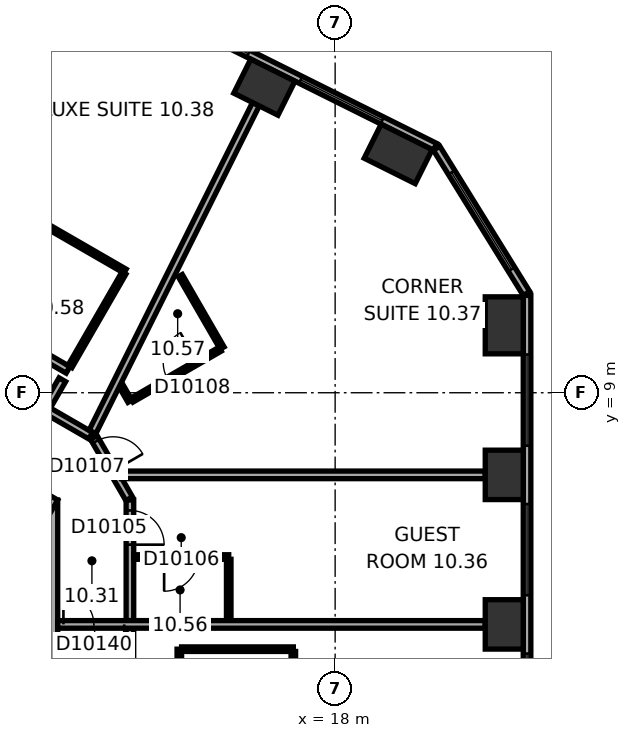
"""IFC4 building model, lengths in metres.
Left out: names, types, materials, properties, quantities, classifications, styles, units other than length and angle.
Written with IfcOpenShell. Run it as: python <this file> out.ifc"""

import sys

from ifc_helpers import new_model, si_unit, direction, frame, frame_2d, origin, origin_2d, place, context, subcontext, project, spatial, rectangle, extrude, element, fill, save


model = new_model("IFC4")
c1 = context("Model", 3, precision=1e-05, world=origin(), true_north=direction((0.0, 1.0)))
c2 = subcontext(c1, "Body", "Model", "MODEL_VIEW")
j1 = project(units=[si_unit("LENGTHUNIT", "METRE"), si_unit("PLANEANGLEUNIT", "RADIAN")], contexts=[c1])
p1 = place(None, origin())
s1 = spatial("IfcSite", under=j1, at=p1, CompositionType="ELEMENT")
p2 = place(p1, origin())
s2 = spatial("IfcBuilding", under=s1, at=p2, CompositionType="ELEMENT")
p3 = place(p2, frame((0.0, 0.0, 53.9)))
s3 = spatial("IfcBuildingStorey", under=s2, at=p3, CompositionType="ELEMENT", Elevation=53.9)
for number, where, z_axis, x_axis in (
    (1, (22.45, 2.905, 0.0), (0.0, 0.0, 1.0), (0.0, 1.0, 0.0)),
    (2, (22.45, 6.839, 0.0), (0.0, 0.0, 1.0), (0.0, 1.0, 0.0)),
):
    element("IfcColumn", number, at=place(p3, frame(where, z_axis=z_axis, x_axis=x_axis)), inside=s3, PredefinedType="COLUMN", context=c2, shape_type="SweptSolid", body=[
        extrude(rectangle(XDim=1.3, YDim=1.0, at=origin_2d()), origin(), (0.0, 0.0, 1.0), 3.3),
    ])
for number, where, z_axis, x_axis in (
    (3, (22.45, 10.774, 0.0), (0.0, 0.0, 1.0), (0.0, 1.0, 0.0)),
    (4, (19.659, 15.284, 0.0), (0.0, 0.0, 1.0), (-0.895, 0.446, 0.0)),
):
    element("IfcColumn", number, at=place(p3, frame(where, z_axis=z_axis, x_axis=x_axis)), inside=s3, PredefinedType="COLUMN", context=c2, shape_type="SweptSolid", body=[
        extrude(rectangle(XDim=1.5, YDim=1.0, at=origin_2d()), origin(), (0.0, 0.0, 1.0), 3.3),
    ])
p4 = place(p3, frame((16.138, 17.04, 0.0), z_axis=(0.0, 0.0, 1.0), x_axis=(-0.894934361602, 0.44619781311, 0.0)))
e5 = element("IfcColumn", 5, at=p4, inside=s3, PredefinedType="COLUMN", context=c2, shape_type="SweptSolid", body=[
    extrude(rectangle(XDim=1.3, YDim=1.0, at=origin_2d()), origin(), (0.0, 0.0, 1.0), 3.3),
])
p5 = place(p3, frame((10.1, -6.177, 0.0), z_axis=(0.0, 0.0, 1.0), x_axis=(0.0, 1.0, 0.0)))
e6 = element("IfcWall", 6, at=p5, inside=s3, PredefinedType="SHEAR", context=c2, shape_type="SweptSolid", body=[
    extrude(rectangle(XDim=12.355, YDim=1.2, at=frame_2d((6.177, 0.0))), origin(), (0.0, 0.0, 1.0), 3.3),
])
p6 = place(p5, frame((6.378, 0.0, 0.0)))
e7 = element("IfcOpeningElement", 7, at=p6, cuts=e6, PredefinedType="OPENING", context=c2, shape_type="SweptSolid", body=[
    extrude(rectangle(XDim=1.5, YDim=2.1, at=frame_2d((0.75, 1.05))), frame((0.0, 0.61, 0.0), z_axis=(0.0, -1.0, 0.0), x_axis=(1.0, 0.0, 0.0)), (0.0, 0.0, 1.0), 1.22),
])
p7 = place(p5, frame((1.828, 0.0, 0.0)))
e8 = element("IfcOpeningElement", 8, at=p7, cuts=e6, PredefinedType="OPENING", context=c2, shape_type="SweptSolid", body=[
    extrude(rectangle(XDim=1.1, YDim=2.1, at=frame_2d((0.55, 1.05))), frame((0.0, 0.61, 0.0), z_axis=(0.0, -1.0, 0.0), x_axis=(1.0, 0.0, 0.0)), (0.0, 0.0, 1.0), 1.22),
])
p8 = place(p5, frame((4.427, 0.0, 0.0)))
e9 = element("IfcOpeningElement", 9, at=p8, cuts=e6, PredefinedType="OPENING", context=c2, shape_type="SweptSolid", body=[
    extrude(rectangle(XDim=1.1, YDim=2.1, at=frame_2d((0.55, 1.05))), frame((0.0, 0.61, 0.0), z_axis=(0.0, -1.0, 0.0), x_axis=(1.0, 0.0, 0.0)), (0.0, 0.0, 1.0), 1.22),
])
p9 = place(p3, frame((10.4, 5.658, 0.0), z_axis=(0.0, 0.0, 1.0), x_axis=(-0.866021384402, 0.500006961711, 0.0)))
e10 = element("IfcWall", 10, at=p9, inside=s3, PredefinedType="SHEAR", context=c2, shape_type="SweptSolid", body=[
    extrude(rectangle(XDim=12.355, YDim=1.2, at=frame_2d((6.178, 0.0))), origin(), (0.0, 0.0, 1.0), 3.3),
])
p10 = place(p9, frame((2.728, 0.0, 0.0)))
e11 = element("IfcOpeningElement", 11, at=p10, cuts=e10, PredefinedType="OPENING", context=c2, shape_type="SweptSolid", body=[
    extrude(rectangle(XDim=1.1, YDim=2.1, at=frame_2d((0.55, 1.05))), frame((0.0, 0.61, 0.0), z_axis=(0.0, -1.0, 0.0), x_axis=(1.0, 0.0, 0.0)), (0.0, 0.0, 1.0), 1.22),
])
p11 = place(p9, frame((5.328, 0.0, 0.0)))
e12 = element("IfcOpeningElement", 12, at=p11, cuts=e10, PredefinedType="OPENING", context=c2, shape_type="SweptSolid", body=[
    extrude(rectangle(XDim=1.1, YDim=2.1, at=frame_2d((0.55, 1.05))), frame((0.0, 0.61, 0.0), z_axis=(0.0, -1.0, 0.0), x_axis=(1.0, 0.0, 0.0)), (0.0, 0.0, 1.0), 1.22),
])
p12 = place(p9, frame((7.928, 0.0, 0.0)))
e13 = element("IfcOpeningElement", 13, at=p12, cuts=e10, PredefinedType="OPENING", context=c2, shape_type="SweptSolid", body=[
    extrude(rectangle(XDim=1.1, YDim=2.1, at=frame_2d((0.55, 1.05))), frame((0.0, 0.61, 0.0), z_axis=(0.0, -1.0, 0.0), x_axis=(1.0, 0.0, 0.0)), (0.0, 0.0, 1.0), 1.22),
])
p13 = place(p3, frame((23.05, -9.687, 0.0), z_axis=(0.0, 0.0, 1.0), x_axis=(0.0, 1.0, 0.0)))
e14 = element("IfcWall", 14, at=p13, inside=s3, PredefinedType="STANDARD", context=c2, shape_type="SweptSolid", body=[
    extrude(rectangle(XDim=21.246, YDim=0.2, at=frame_2d((10.623, 0.0))), origin(), (0.0, 0.0, 1.0), 3.3),
])
p14 = place(p13, frame((1.555, 0.0, 0.8)))
e15 = element("IfcOpeningElement", 15, at=p14, cuts=e14, PredefinedType="OPENING", context=c2, shape_type="SweptSolid", body=[
    extrude(rectangle(XDim=2.4, YDim=1.7, at=frame_2d((1.2, 0.85))), frame((0.0, 0.11, 0.0), z_axis=(0.0, -1.0, 0.0), x_axis=(1.0, 0.0, 0.0)), (0.0, 0.0, 1.0), 0.22),
])
p15 = place(p13, frame((5.489, 0.0, 0.8)))
e16 = element("IfcOpeningElement", 16, at=p15, cuts=e14, PredefinedType="OPENING", context=c2, shape_type="SweptSolid", body=[
    extrude(rectangle(XDim=2.4, YDim=1.7, at=frame_2d((1.2, 0.85))), frame((0.0, 0.11, 0.0), z_axis=(0.0, -1.0, 0.0), x_axis=(1.0, 0.0, 0.0)), (0.0, 0.0, 1.0), 0.22),
])
p16 = place(p13, frame((9.424, 0.0, 0.8)))
e17 = element("IfcOpeningElement", 17, at=p16, cuts=e14, PredefinedType="OPENING", context=c2, shape_type="SweptSolid", body=[
    extrude(rectangle(XDim=2.4, YDim=1.7, at=frame_2d((1.2, 0.85))), frame((0.0, 0.11, 0.0), z_axis=(0.0, -1.0, 0.0), x_axis=(1.0, 0.0, 0.0)), (0.0, 0.0, 1.0), 0.22),
])
p17 = place(p13, frame((13.358, 0.0, 0.8)))
e18 = element("IfcOpeningElement", 18, at=p17, cuts=e14, PredefinedType="OPENING", context=c2, shape_type="SweptSolid", body=[
    extrude(rectangle(XDim=2.4, YDim=1.7, at=frame_2d((1.2, 0.85))), frame((0.0, 0.11, 0.0), z_axis=(0.0, -1.0, 0.0), x_axis=(1.0, 0.0, 0.0)), (0.0, 0.0, 1.0), 0.22),
])
p18 = place(p13, frame((17.293, 0.0, 0.8)))
e19 = element("IfcOpeningElement", 19, at=p18, cuts=e14, PredefinedType="OPENING", context=c2, shape_type="SweptSolid", body=[
    extrude(rectangle(XDim=2.4, YDim=1.7, at=frame_2d((1.2, 0.85))), frame((0.0, 0.11, 0.0), z_axis=(0.0, -1.0, 0.0), x_axis=(1.0, 0.0, 0.0)), (0.0, 0.0, 1.0), 0.22),
])
p19 = place(p3, frame((23.035, 11.612, 0.0), z_axis=(0.0, 0.0, 1.0), x_axis=(-0.526160091227, 0.850385535155, 0.0)))
e20 = element("IfcWall", 20, at=p19, inside=s3, PredefinedType="STANDARD", context=c2, shape_type="SweptSolid", body=[
    extrude(rectangle(XDim=4.494, YDim=0.2, at=frame_2d((2.247, 0.0))), origin(), (0.0, 0.0, 1.0), 3.3),
])
p20 = place(p19, frame((0.747, 0.0, 0.8)))
e21 = element("IfcOpeningElement", 21, at=p20, cuts=e20, PredefinedType="OPENING", context=c2, shape_type="SweptSolid", body=[
    extrude(rectangle(XDim=3.0, YDim=1.7, at=frame_2d((1.5, 0.85))), frame((0.0, 0.11, 0.0), z_axis=(0.0, -1.0, 0.0), x_axis=(1.0, 0.0, 0.0)), (0.0, 0.0, 1.0), 0.22),
])
p21 = place(p3, frame((20.63, 15.47, 0.0), z_axis=(0.0, 0.0, 1.0), x_axis=(-0.894934518609, 0.446197498203, 0.0)))
e22 = element("IfcWall", 22, at=p21, inside=s3, PredefinedType="STANDARD", context=c2, shape_type="SweptSolid", body=[
    extrude(rectangle(XDim=21.246, YDim=0.2, at=frame_2d((10.623, 0.0))), origin(), (0.0, 0.0, 1.0), 3.3),
])
p22 = place(p21, frame((1.553, 0.0, 0.8)))
e23 = element("IfcOpeningElement", 23, at=p22, cuts=e22, PredefinedType="OPENING", context=c2, shape_type="SweptSolid", body=[
    extrude(rectangle(XDim=2.4, YDim=1.7, at=frame_2d((1.2, 0.85))), frame((0.0, 0.11, 0.0), z_axis=(0.0, -1.0, 0.0), x_axis=(1.0, 0.0, 0.0)), (0.0, 0.0, 1.0), 0.22),
])
p23 = place(p21, frame((5.488, 0.0, 0.8)))
e24 = element("IfcOpeningElement", 24, at=p23, cuts=e22, PredefinedType="OPENING", context=c2, shape_type="SweptSolid", body=[
    extrude(rectangle(XDim=2.4, YDim=1.7, at=frame_2d((1.2, 0.85))), frame((0.0, 0.11, 0.0), z_axis=(0.0, -1.0, 0.0), x_axis=(1.0, 0.0, 0.0)), (0.0, 0.0, 1.0), 0.22),
])
p24 = place(p21, frame((9.422, 0.0, 0.8)))
e25 = element("IfcOpeningElement", 25, at=p24, cuts=e22, PredefinedType="OPENING", context=c2, shape_type="SweptSolid", body=[
    extrude(rectangle(XDim=2.4, YDim=1.7, at=frame_2d((1.2, 0.85))), frame((0.0, 0.11, 0.0), z_axis=(0.0, -1.0, 0.0), x_axis=(1.0, 0.0, 0.0)), (0.0, 0.0, 1.0), 0.22),
])
p25 = place(p21, frame((13.357, 0.0, 0.8)))
e26 = element("IfcOpeningElement", 26, at=p25, cuts=e22, PredefinedType="OPENING", context=c2, shape_type="SweptSolid", body=[
    extrude(rectangle(XDim=2.4, YDim=1.7, at=frame_2d((1.2, 0.85))), frame((0.0, 0.11, 0.0), z_axis=(0.0, -1.0, 0.0), x_axis=(1.0, 0.0, 0.0)), (0.0, 0.0, 1.0), 0.22),
])
p26 = place(p21, frame((17.292, 0.0, 0.8)))
e27 = element("IfcOpeningElement", 27, at=p26, cuts=e22, PredefinedType="OPENING", context=c2, shape_type="SweptSolid", body=[
    extrude(rectangle(XDim=2.4, YDim=1.7, at=frame_2d((1.2, 0.85))), frame((0.0, 0.11, 0.0), z_axis=(0.0, -1.0, 0.0), x_axis=(1.0, 0.0, 0.0)), (0.0, 0.0, 1.0), 0.22),
])
p27 = place(p3, frame((9.926, 13.67, 0.0), z_axis=(0.0, 0.0, 1.0), x_axis=(0.866032090307, -0.499988418424, 0.0)))
e28 = element("IfcWall", 28, at=p27, inside=s3, PredefinedType="PARTITIONING", context=c2, shape_type="SweptSolid", body=[
    extrude(rectangle(XDim=2.94, YDim=0.12, at=frame_2d((1.47, 0.0))), origin(), (0.0, 0.0, 1.0), 3.05),
])
p28 = place(p3, frame((10.371, 8.561, 0.0), z_axis=(0.0, 0.0, 1.0), x_axis=(0.50004290449, 0.866000631449, 0.0)))
e29 = element("IfcWall", 29, at=p28, inside=s3, PredefinedType="PARTITIONING", context=c2, shape_type="SweptSolid", body=[
    extrude(rectangle(XDim=0.901, YDim=0.2, at=frame_2d((0.451, 0.0))), origin(), (0.0, 0.0, 1.0), 3.05),
])
p29 = place(p3, frame((10.972, 9.602, 0.0), z_axis=(0.0, 0.0, 1.0), x_axis=(-0.866033277307, 0.499986362411, 0.0)))
e30 = element("IfcWall", 30, at=p29, inside=s3, PredefinedType="PARTITIONING", context=c2, shape_type="SweptSolid", body=[
    extrude(rectangle(XDim=8.702, YDim=0.2, at=frame_2d((4.351, 0.0))), origin(), (0.0, 0.0, 1.0), 3.05),
])
p30 = place(p29, frame((4.364, 0.0, 0.0)))
e31 = element("IfcOpeningElement", 31, at=p30, cuts=e30, PredefinedType="OPENING", context=c2, shape_type="SweptSolid", body=[
    extrude(rectangle(XDim=0.9, YDim=2.1, at=frame_2d((0.45, 1.05))), frame((0.0, 0.11, 0.0), z_axis=(0.0, -1.0, 0.0), x_axis=(1.0, 0.0, 0.0)), (0.0, 0.0, 1.0), 0.22),
])
p31 = place(p3, frame((11.566, 7.871, 0.0), z_axis=(0.0, 0.0, 1.0), x_axis=(-0.866004557827, 0.500036104519, 0.0)))
e32 = element("IfcWall", 32, at=p31, inside=s3, PredefinedType="PARTITIONING", context=c2, shape_type="SweptSolid", body=[
    extrude(rectangle(XDim=1.28, YDim=0.2, at=frame_2d((0.64, 0.0))), origin(), (0.0, 0.0, 1.0), 3.05),
])
p32 = place(p3, frame((12.442, 12.148, 0.0), z_axis=(0.0, 0.0, 1.0), x_axis=(-0.49994816717, -0.866055327414, 0.0)))
e33 = element("IfcWall", 33, at=p32, inside=s3, PredefinedType="PARTITIONING", context=c2, shape_type="SweptSolid", body=[
    extrude(rectangle(XDim=2.84, YDim=0.12, at=frame_2d((1.42, 0.0))), origin(), (0.0, 0.0, 1.0), 3.05),
])
p33 = place(p3, frame((12.58, 6.212, 0.0), z_axis=(0.0, 0.0, 1.0), x_axis=(-0.500063286585, 0.865988862174, 0.0)))
e34 = element("IfcWall", 34, at=p33, inside=s3, PredefinedType="PARTITIONING", context=c2, shape_type="SweptSolid", body=[
    extrude(rectangle(XDim=1.86, YDim=0.2, at=frame_2d((0.93, 0.0))), origin(), (0.0, 0.0, 1.0), 3.05),
])
p34 = place(p33, frame((0.842, 0.0, 0.0)))
e35 = element("IfcOpeningElement", 35, at=p34, cuts=e34, PredefinedType="OPENING", context=c2, shape_type="SweptSolid", body=[
    extrude(rectangle(XDim=0.9, YDim=2.1, at=frame_2d((0.45, 1.05))), frame((0.0, 0.11, 0.0), z_axis=(0.0, -1.0, 0.0), x_axis=(1.0, 0.0, 0.0)), (0.0, 0.0, 1.0), 0.22),
])
p35 = place(p3, frame((12.6, 0.201, 0.0), z_axis=(0.0, 0.0, 1.0), x_axis=(0.0, 1.0, 0.0)))
e36 = element("IfcWall", 36, at=p35, inside=s3, PredefinedType="PARTITIONING", context=c2, shape_type="SweptSolid", body=[
    extrude(rectangle(XDim=2.604, YDim=0.2, at=frame_2d((1.302, 0.0))), origin(), (0.0, 0.0, 1.0), 3.05),
])
p36 = place(p3, frame((12.6, 3.004, 0.0), z_axis=(0.0, 0.0, 1.0), x_axis=(0.0, 1.0, 0.0)))
e37 = element("IfcWall", 37, at=p36, inside=s3, PredefinedType="PARTITIONING", context=c2, shape_type="SweptSolid", body=[
    extrude(rectangle(XDim=3.173, YDim=0.2, at=frame_2d((1.586, 0.0))), origin(), (0.0, 0.0, 1.0), 3.05),
])
p37 = place(p36, frame((1.998, 0.0, 0.0)))
e38 = element("IfcOpeningElement", 38, at=p37, cuts=e37, PredefinedType="OPENING", context=c2, shape_type="SweptSolid", body=[
    extrude(rectangle(XDim=0.9, YDim=2.1, at=frame_2d((0.45, 1.05))), frame((0.0, 0.11, 0.0), z_axis=(0.0, -1.0, 0.0), x_axis=(1.0, 0.0, 0.0)), (0.0, 0.0, 1.0), 0.22),
])
p38 = place(p3, frame((12.601, 8.776, 0.0), z_axis=(0.0, 0.0, 1.0), x_axis=(-0.500166486798, 0.865929261247, 0.0)))
e39 = element("IfcWall", 39, at=p38, inside=s3, PredefinedType="PARTITIONING", context=c2, shape_type="SweptSolid", body=[
    extrude(rectangle(XDim=0.476, YDim=0.12, at=frame_2d((0.238, 0.0))), origin(), (0.0, 0.0, 1.0), 3.05),
])
p39 = place(p3, frame((12.7, 4.677, 0.0), z_axis=(0.0, 0.0, 1.0), x_axis=(1.0, 0.0, 0.0)))
e40 = element("IfcWall", 40, at=p39, inside=s3, PredefinedType="PARTITIONING", context=c2, shape_type="SweptSolid", body=[
    extrude(rectangle(XDim=2.5, YDim=0.12, at=frame_2d((1.25, 0.0))), origin(), (0.0, 0.0, 1.0), 3.05),
])
p40 = place(p39, frame((0.8, 0.0, 0.0)))
e41 = element("IfcOpeningElement", 41, at=p40, cuts=e40, PredefinedType="OPENING", context=c2, shape_type="SweptSolid", body=[
    extrude(rectangle(XDim=0.9, YDim=2.1, at=frame_2d((0.45, 1.05))), frame((0.0, 0.07, 0.0), z_axis=(0.0, -1.0, 0.0), x_axis=(1.0, 0.0, 0.0)), (0.0, 0.0, 1.0), 0.14),
])
p41 = place(p3, frame((13.9, 0.853, 0.0), z_axis=(0.0, 0.0, 1.0), x_axis=(0.0, 1.0, 0.0)))
e42 = element("IfcWall", 42, at=p41, inside=s3, PredefinedType="PARTITIONING", context=c2, shape_type="SweptSolid", body=[
    extrude(rectangle(XDim=1.4, YDim=0.12, at=frame_2d((0.7, 0.0))), origin(), (0.0, 0.0, 1.0), 3.05),
])
p42 = place(p3, frame((13.926, 12.081, 0.0), z_axis=(0.0, 0.0, 1.0), x_axis=(0.499994660107, -0.866028486751, 0.0)))
e43 = element("IfcWall", 43, at=p42, inside=s3, PredefinedType="PARTITIONING", context=c2, shape_type="SweptSolid", body=[
    extrude(rectangle(XDim=2.2, YDim=0.12, at=frame_2d((1.1, 0.0))), origin(), (0.0, 0.0, 1.0), 3.05),
])
p43 = place(p3, frame((13.96, 2.253, 0.0), z_axis=(0.0, 0.0, 1.0), x_axis=(1.0, 0.0, 0.0)))
e44 = element("IfcWall", 44, at=p43, inside=s3, PredefinedType="PARTITIONING", context=c2, shape_type="SweptSolid", body=[
    extrude(rectangle(XDim=2.94, YDim=0.12, at=frame_2d((1.47, 0.0))), origin(), (0.0, 0.0, 1.0), 3.05),
])
p44 = place(p3, frame((14.974, 10.146, 0.0), z_axis=(0.0, 0.0, 1.0), x_axis=(-0.86599746015, -0.500048396672, 0.0)))
e45 = element("IfcWall", 45, at=p44, inside=s3, PredefinedType="PARTITIONING", context=c2, shape_type="SweptSolid", body=[
    extrude(rectangle(XDim=2.68, YDim=0.12, at=frame_2d((1.34, 0.0))), origin(), (0.0, 0.0, 1.0), 3.05),
])
p45 = place(p44, frame((0.69, 0.0, 0.0)))
e46 = element("IfcOpeningElement", 46, at=p45, cuts=e45, PredefinedType="OPENING", context=c2, shape_type="SweptSolid", body=[
    extrude(rectangle(XDim=0.9, YDim=2.1, at=frame_2d((0.45, 1.05))), frame((0.0, 0.07, 0.0), z_axis=(0.0, -1.0, 0.0), x_axis=(1.0, 0.0, 0.0)), (0.0, 0.0, 1.0), 0.14),
])
p46 = place(p3, frame((15.2, 4.618, 0.0), z_axis=(0.0, 0.0, 1.0), x_axis=(0.0, -1.0, 0.0)))
e47 = element("IfcWall", 47, at=p46, inside=s3, PredefinedType="PARTITIONING", context=c2, shape_type="SweptSolid", body=[
    extrude(rectangle(XDim=1.613, YDim=0.12, at=frame_2d((0.807, 0.0))), origin(), (0.0, 0.0, 1.0), 3.05),
])
p47 = place(p3, frame((15.915, 16.592, 0.0), z_axis=(0.0, 0.0, 1.0), x_axis=(-0.446199736347, -0.894933402709, 0.0)))
e48 = element("IfcWall", 48, at=p47, inside=s3, PredefinedType="PARTITIONING", context=c2, shape_type="SweptSolid", body=[
    extrude(rectangle(XDim=9.635, YDim=0.2, at=frame_2d((4.817, 0.0))), origin(), (0.0, 0.0, 1.0), 3.05),
])
p48 = place(p3, frame((16.9, 2.193, 0.0), z_axis=(0.0, 0.0, 1.0), x_axis=(0.0, -1.0, 0.0)))
e49 = element("IfcWall", 49, at=p48, inside=s3, PredefinedType="PARTITIONING", context=c2, shape_type="SweptSolid", body=[
    extrude(rectangle(XDim=1.28, YDim=0.12, at=frame_2d((0.64, 0.0))), origin(), (0.0, 0.0, 1.0), 3.05),
])
p49 = place(p3, frame((21.95, 2.905, 0.0), z_axis=(0.0, 0.0, 1.0), x_axis=(-1.0, 0.0, 0.0)))
e50 = element("IfcWall", 50, at=p49, inside=s3, PredefinedType="PARTITIONING", context=c2, shape_type="SweptSolid", body=[
    extrude(rectangle(XDim=11.25, YDim=0.2, at=frame_2d((5.625, 0.0))), origin(), (0.0, 0.0, 1.0), 3.05),
])
p50 = place(p49, frame((9.5, 0.0, 0.0)))
e51 = element("IfcOpeningElement", 51, at=p50, cuts=e50, PredefinedType="OPENING", context=c2, shape_type="SweptSolid", body=[
    extrude(rectangle(XDim=1.6, YDim=2.1, at=frame_2d((0.8, 1.05))), frame((0.0, 0.11, 0.0), z_axis=(0.0, -1.0, 0.0), x_axis=(1.0, 0.0, 0.0)), (0.0, 0.0, 1.0), 0.22),
])
p51 = place(p3, frame((21.95, 6.839, 0.0), z_axis=(0.0, 0.0, 1.0), x_axis=(-1.0, 0.0, 0.0)))
e52 = element("IfcWall", 52, at=p51, inside=s3, PredefinedType="PARTITIONING", context=c2, shape_type="SweptSolid", body=[
    extrude(rectangle(XDim=9.572, YDim=0.2, at=frame_2d((4.786, 0.0))), origin(), (0.0, 0.0, 1.0), 3.05),
])
p52 = place(p16, origin())
e53 = element("IfcWindow", 53, at=p52, inside=s3, PartitioningType="SINGLE_PANEL", PredefinedType="WINDOW", context=c2, shape_type="SweptSolid", body=[
    extrude(rectangle(XDim=2.4, YDim=1.7, at=frame_2d((1.2, 0.85))), frame((0.0, 0.03, 0.0), z_axis=(0.0, -1.0, 0.0), x_axis=(1.0, 0.0, 0.0)), (0.0, 0.0, 1.0), 0.06),
])
fill(e17, e53)
p53 = place(p17, origin())
e54 = element("IfcWindow", 54, at=p53, inside=s3, PartitioningType="SINGLE_PANEL", PredefinedType="WINDOW", context=c2, shape_type="SweptSolid", body=[
    extrude(rectangle(XDim=2.4, YDim=1.7, at=frame_2d((1.2, 0.85))), frame((0.0, 0.03, 0.0), z_axis=(0.0, -1.0, 0.0), x_axis=(1.0, 0.0, 0.0)), (0.0, 0.0, 1.0), 0.06),
])
fill(e18, e54)
p54 = place(p18, origin())
e55 = element("IfcWindow", 55, at=p54, inside=s3, PartitioningType="SINGLE_PANEL", PredefinedType="WINDOW", context=c2, shape_type="SweptSolid", body=[
    extrude(rectangle(XDim=2.4, YDim=1.7, at=frame_2d((1.2, 0.85))), frame((0.0, 0.03, 0.0), z_axis=(0.0, -1.0, 0.0), x_axis=(1.0, 0.0, 0.0)), (0.0, 0.0, 1.0), 0.06),
])
fill(e19, e55)
p55 = place(p20, origin())
e56 = element("IfcWindow", 56, at=p55, inside=s3, PartitioningType="SINGLE_PANEL", PredefinedType="WINDOW", context=c2, shape_type="SweptSolid", body=[
    extrude(rectangle(XDim=3.0, YDim=1.7, at=frame_2d((1.5, 0.85))), frame((0.0, 0.03, 0.0), z_axis=(0.0, -1.0, 0.0), x_axis=(1.0, 0.0, 0.0)), (0.0, 0.0, 1.0), 0.06),
])
fill(e21, e56)
p56 = place(p22, origin())
e57 = element("IfcWindow", 57, at=p56, inside=s3, PartitioningType="SINGLE_PANEL", PredefinedType="WINDOW", context=c2, shape_type="SweptSolid", body=[
    extrude(rectangle(XDim=2.4, YDim=1.7, at=frame_2d((1.2, 0.85))), frame((0.0, 0.03, 0.0), z_axis=(0.0, -1.0, 0.0), x_axis=(1.0, 0.0, 0.0)), (0.0, 0.0, 1.0), 0.06),
])
fill(e23, e57)
p57 = place(p23, origin())
e58 = element("IfcWindow", 58, at=p57, inside=s3, PartitioningType="SINGLE_PANEL", PredefinedType="WINDOW", context=c2, shape_type="SweptSolid", body=[
    extrude(rectangle(XDim=2.4, YDim=1.7, at=frame_2d((1.2, 0.85))), frame((0.0, 0.03, 0.0), z_axis=(0.0, -1.0, 0.0), x_axis=(1.0, 0.0, 0.0)), (0.0, 0.0, 1.0), 0.06),
])
fill(e24, e58)
p58 = place(p37, origin())
e59 = element("IfcDoor", 59, at=p58, inside=s3, OperationType="SINGLE_SWING_LEFT", PredefinedType="DOOR", context=c2, shape_type="SweptSolid", body=[
    extrude(rectangle(XDim=0.9, YDim=2.1, at=frame_2d((0.45, 1.05))), frame((0.0, 0.025, 0.0), z_axis=(0.0, -1.0, 0.0), x_axis=(1.0, 0.0, 0.0)), (0.0, 0.0, 1.0), 0.05),
])
fill(e38, e59)
p59 = place(p40, origin())
e60 = element("IfcDoor", 60, at=p59, inside=s3, OperationType="SINGLE_SWING_LEFT", PredefinedType="DOOR", context=c2, shape_type="SweptSolid", body=[
    extrude(rectangle(XDim=0.9, YDim=2.1, at=frame_2d((0.45, 1.05))), frame((0.0, 0.025, 0.0), z_axis=(0.0, -1.0, 0.0), x_axis=(1.0, 0.0, 0.0)), (0.0, 0.0, 1.0), 0.05),
])
fill(e41, e60)
p60 = place(p34, origin())
e61 = element("IfcDoor", 61, at=p60, inside=s3, OperationType="SINGLE_SWING_LEFT", PredefinedType="DOOR", context=c2, shape_type="SweptSolid", body=[
    extrude(rectangle(XDim=0.9, YDim=2.1, at=frame_2d((0.45, 1.05))), frame((0.0, 0.025, 0.0), z_axis=(0.0, -1.0, 0.0), x_axis=(1.0, 0.0, 0.0)), (0.0, 0.0, 1.0), 0.05),
])
fill(e35, e61)
p61 = place(p45, origin())
e62 = element("IfcDoor", 62, at=p61, inside=s3, OperationType="SINGLE_SWING_LEFT", PredefinedType="DOOR", context=c2, shape_type="SweptSolid", body=[
    extrude(rectangle(XDim=0.9, YDim=2.1, at=frame_2d((0.45, 1.05))), frame((0.0, 0.025, 0.0), z_axis=(0.0, -1.0, 0.0), x_axis=(1.0, 0.0, 0.0)), (0.0, 0.0, 1.0), 0.05),
])
fill(e46, e62)
p62 = place(p50, origin())
e63 = element("IfcDoor", 63, at=p62, inside=s3, OperationType="DOUBLE_DOOR_SINGLE_SWING", PredefinedType="DOOR", context=c2, shape_type="SweptSolid", body=[
    extrude(rectangle(XDim=1.6, YDim=2.1, at=frame_2d((0.8, 1.05))), frame((0.0, 0.025, 0.0), z_axis=(0.0, -1.0, 0.0), x_axis=(1.0, 0.0, 0.0)), (0.0, 0.0, 1.0), 0.05),
])
fill(e51, e63)
save(model, sys.argv[1])
